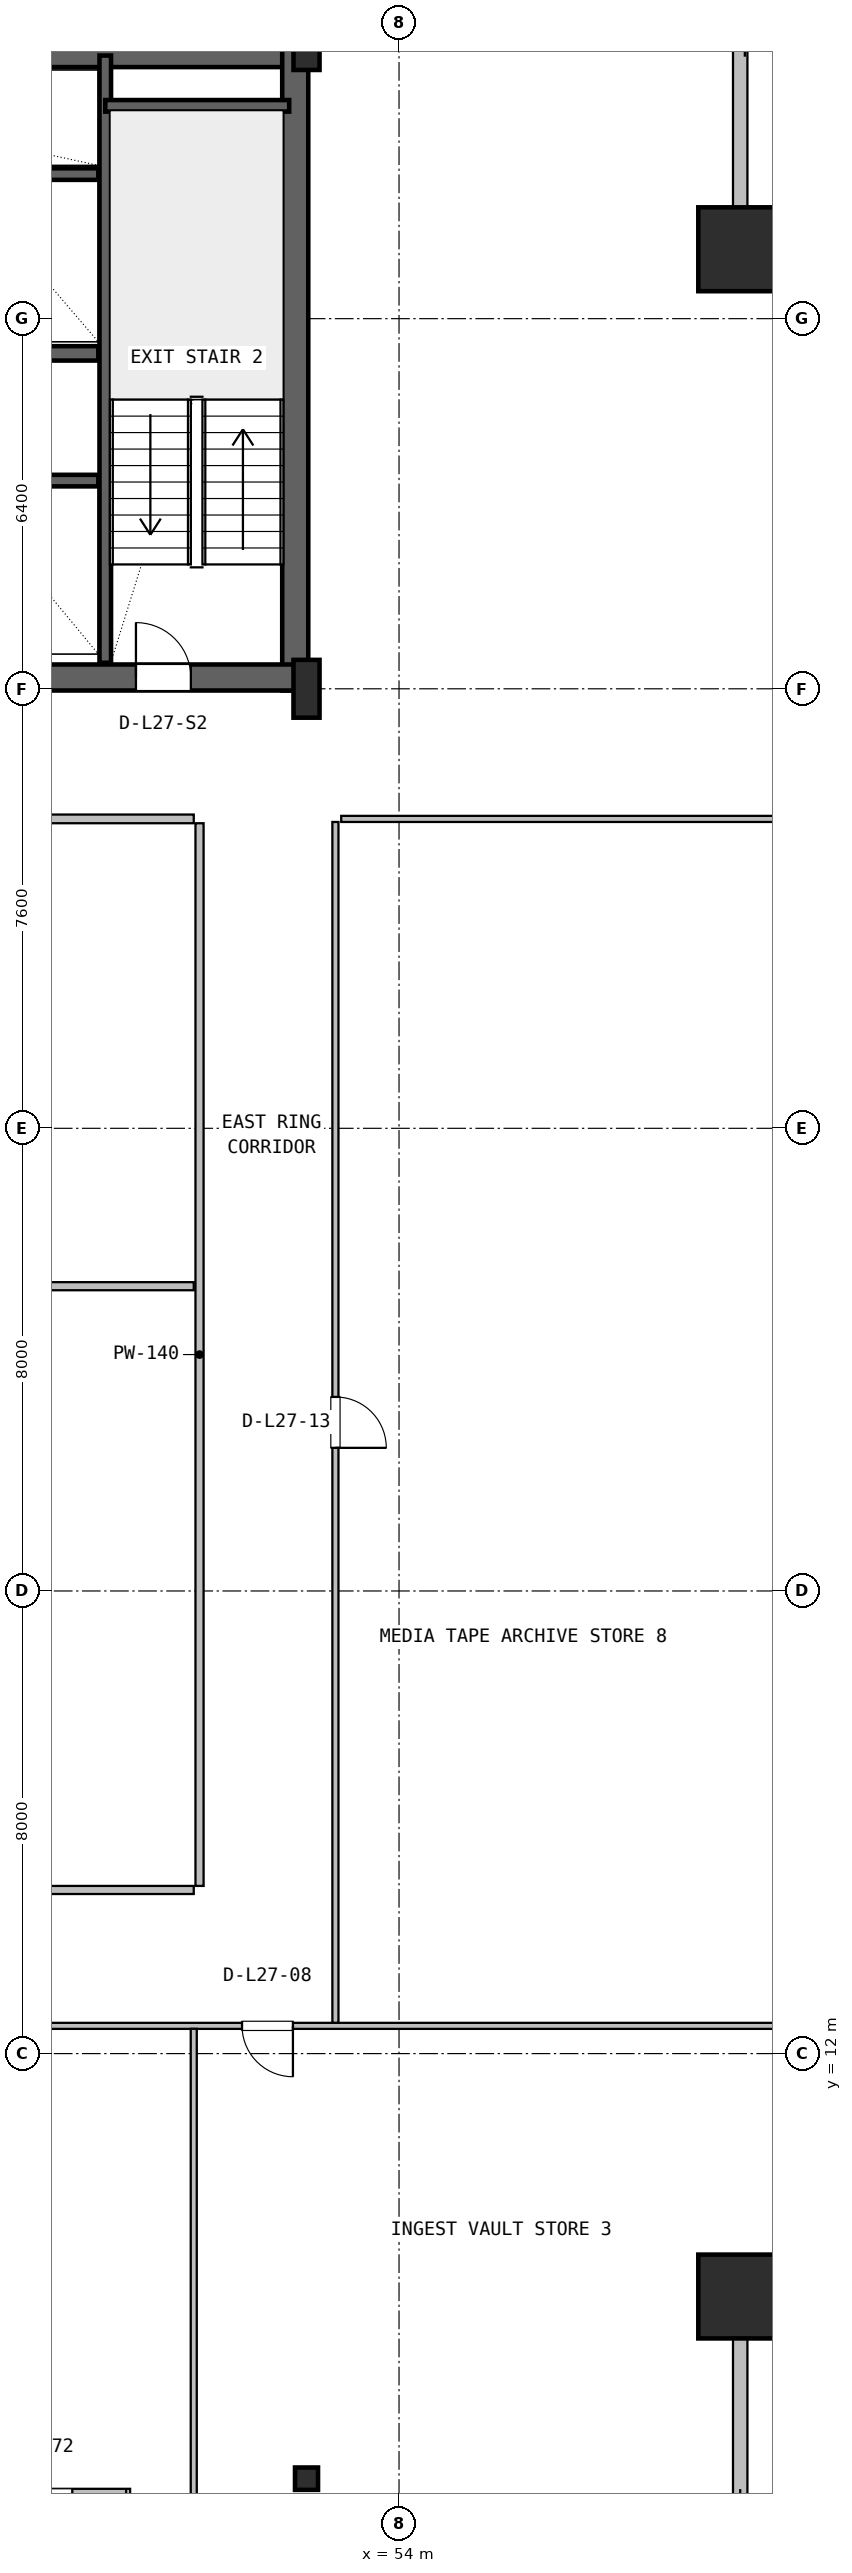
"""IFC4 building model, lengths in metres.
Left out: names, types, materials, properties, quantities, classifications, styles, units other than length and angle.
Written with IfcOpenShell. Run it as: python <this file> out.ifc"""

import sys

from ifc_helpers import new_model, si_unit, direction, frame, frame_2d, origin, origin_2d, place, context, subcontext, project, spatial, rectangle, hollow_rectangle, i_section, extrude, source, transform, mapped, element, fill, save


model = new_model("IFC4")
c1 = context("Model", 3, precision=1e-05, world=origin(), true_north=direction((0.0, 1.0)))
c2 = subcontext(c1, "Body", "Model", "MODEL_VIEW")
j1 = project(units=[si_unit("LENGTHUNIT", "METRE"), si_unit("PLANEANGLEUNIT", "RADIAN")], contexts=[c1])
p1 = place(None, origin())
s1 = spatial("IfcSite", under=j1, at=p1, CompositionType="ELEMENT")
p2 = place(p1, origin())
s2 = spatial("IfcBuilding", under=s1, at=p2, CompositionType="ELEMENT")
p3 = place(p2, frame((0.0, 0.0, 114.4)))
s3 = spatial("IfcBuildingStorey", under=s2, at=p3, CompositionType="ELEMENT", Elevation=114.4)
p4 = place(p3, frame((15.6, 46.575, 0.0), z_axis=(0.0, 0.0, 1.0), x_axis=(1.0, 0.0, 0.0)))
e1 = element("IfcWall", 1, at=p4, inside=s3, PredefinedType="SHEAR", context=c2, shape_type="SweptSolid", body=[
    extrude(rectangle(XDim=36.8, YDim=0.45, at=frame_2d((18.4, 0.0))), origin(), (0.0, 0.0, 1.0), 3.55),
])
p5 = place(p3, frame((52.205, 35.57, 0.0), z_axis=(0.0, 0.0, 1.0), x_axis=(0.0, 1.0, 0.0)))
e2 = element("IfcWall", 2, at=p5, inside=s3, PredefinedType="SHEAR", context=c2, shape_type="SweptSolid", body=[
    extrude(rectangle(XDim=11.23, YDim=0.45, at=frame_2d((5.615, 0.0))), origin(), (0.0, 0.0, 1.0), 3.55),
])
p6 = place(p3, frame((43.2, 35.795, 0.0), z_axis=(0.0, 0.0, 1.0), x_axis=(1.0, 0.0, 0.0)))
e3 = element("IfcWall", 3, at=p6, inside=s3, PredefinedType="SHEAR", context=c2, shape_type="SweptSolid", body=[
    extrude(rectangle(XDim=9.23, YDim=0.45, at=frame_2d((4.615, 0.0))), origin(), (0.0, 0.0, 1.0), 3.55),
])
p7 = place(p6, frame((6.25, 0.0, 0.0)))
e4 = element("IfcOpeningElement", 4, at=p7, cuts=e3, PredefinedType="OPENING", context=c2, shape_type="SweptSolid", body=[
    extrude(rectangle(XDim=0.95, YDim=2.1, at=frame_2d((0.475, 1.05))), frame((0.0, 0.235, 0.0), z_axis=(0.0, -1.0, 0.0), x_axis=(1.0, 0.0, 0.0)), (0.0, 0.0, 1.0), 0.47),
])
m1 = source(origin(), c2, "Body", "SweptSolid", [
    extrude(i_section(OverallWidth=0.45, OverallDepth=1.0, WebThickness=0.016, FlangeThickness=0.03, FilletRadius=0.016, at=origin_2d()), origin(), (0.0, 0.0, 1.0), 3.8),
])
for number, where, z_axis, x_axis in (
    (5, (52.4, 35.6, 0.0), (0.0, 0.0, 1.0), (1.0, 0.0, 0.0)),
    (6, (52.4, 46.8, 0.0), (0.0, 0.0, 1.0), (1.0, 0.0, 0.0)),
):
    element("IfcColumn", number, at=place(p3, frame(where, z_axis=z_axis, x_axis=x_axis)), inside=s3, PredefinedType="COLUMN", context=c2, shape_type="MappedRepresentation", body=[
        mapped(m1, transform((0.0, 0.0, 0.0), x_axis=(1.0, 0.0, 0.0), y_axis=(0.0, 1.0, 0.0), z_axis=(0.0, 0.0, 1.0), scale=1.0)),
    ])
m2 = source(origin(), c2, "Body", "SweptSolid", [
    extrude(hollow_rectangle(XDim=1.45, YDim=1.45, WallThickness=0.055, at=origin_2d()), origin(), (0.0, 0.0, 1.0), 3.8),
])
for number, where, z_axis, x_axis in (
    (7, (59.9, 7.8, 0.0), (0.0, 0.0, 1.0), (1.0, 0.0, 0.0)),
    (8, (59.9, 43.2, 0.0), (0.0, 0.0, 1.0), (1.0, 0.0, 0.0)),
):
    element("IfcColumn", number, at=place(p3, frame(where, z_axis=z_axis, x_axis=x_axis)), inside=s3, PredefinedType="COLUMN", context=c2, shape_type="MappedRepresentation", body=[
        mapped(m2, transform((0.0, 0.0, 0.0), x_axis=(1.0, 0.0, 0.0), y_axis=(0.0, 1.0, 0.0), z_axis=(0.0, 0.0, 1.0), scale=1.0)),
    ])
m3 = source(origin(), c2, "Body", "SweptSolid", [
    extrude(i_section(OverallWidth=0.398, OverallDepth=0.387, WebThickness=0.021, FlangeThickness=0.033, FilletRadius=0.018, at=origin_2d()), origin(), (0.0, 0.0, 1.0), 3.8),
])
p8 = place(p3, frame((52.4, 4.65, 0.0), z_axis=(0.0, 0.0, 1.0), x_axis=(1.0, 0.0, 0.0)))
e9 = element("IfcColumn", 9, at=p8, inside=s3, PredefinedType="COLUMN", context=c2, shape_type="MappedRepresentation", body=[
    mapped(m3, transform((0.0, 0.0, 0.0), x_axis=(1.0, 0.0, 0.0), y_axis=(0.0, 1.0, 0.0), z_axis=(0.0, 0.0, 1.0), scale=1.0)),
])
p9 = place(p3, frame((46.25, 4.35, 0.0), z_axis=(0.0, 0.0, 1.0), x_axis=(1.0, 0.0, 0.0)))
e10 = element("IfcWall", 10, at=p9, inside=s3, PredefinedType="SOLIDWALL", context=c2, shape_type="SweptSolid", body=[
    extrude(rectangle(XDim=3.1, YDim=0.25, at=frame_2d((1.55, 0.0))), origin(), (0.0, 0.0, 1.0), 3.53),
])
p10 = place(p9, frame((1.0, 0.0, 0.0)))
e11 = element("IfcOpeningElement", 11, at=p10, cuts=e10, PredefinedType="OPENING", context=c2, shape_type="SweptSolid", body=[
    extrude(rectangle(XDim=1.1, YDim=2.15, at=frame_2d((0.55, 1.075))), frame((0.0, 0.135, 0.0), z_axis=(0.0, -1.0, 0.0), x_axis=(1.0, 0.0, 0.0)), (0.0, 0.0, 1.0), 0.27),
])
p11 = place(p3, frame((59.9, 4.28, 0.0), z_axis=(0.0, 0.0, 1.0), x_axis=(0.0, 1.0, 0.0)))
e12 = element("IfcWall", 12, at=p11, inside=s3, PredefinedType="SOLIDWALL", context=c2, shape_type="SweptSolid", body=[
    extrude(rectangle(XDim=3.6, YDim=0.25, at=frame_2d((1.8, 0.0))), origin(), (0.0, 0.0, 1.0), 3.108),
])
p12 = place(p3, frame((60.03, 43.2, 0.0), z_axis=(0.0, 0.0, 1.0), x_axis=(1.0, 0.0, 0.0)))
e13 = element("IfcWall", 13, at=p12, inside=s3, PredefinedType="SOLIDWALL", context=c2, shape_type="SweptSolid", body=[
    extrude(rectangle(XDim=3.39, YDim=0.25, at=frame_2d((1.695, 0.0))), origin(), (0.0, 0.0, 1.0), 3.53),
])
p13 = place(p3, frame((59.9, 43.12, 0.0), z_axis=(0.0, 0.0, 1.0), x_axis=(0.0, 1.0, 0.0)))
e14 = element("IfcWall", 14, at=p13, inside=s3, PredefinedType="SOLIDWALL", context=c2, shape_type="SweptSolid", body=[
    extrude(rectangle(XDim=3.6, YDim=0.25, at=frame_2d((1.8, 0.0))), origin(), (0.0, 0.0, 1.0), 3.108),
])
p14 = place(p3, frame((48.92, 36.05, 0.0), z_axis=(0.0, 0.0, 1.0), x_axis=(0.0, 1.0, 0.0)))
e15 = element("IfcWall", 15, at=p14, inside=s3, PredefinedType="SHEAR", context=c2, shape_type="SweptSolid", body=[
    extrude(rectangle(XDim=10.5, YDim=0.2, at=frame_2d((5.25, 0.0))), origin(), (0.0, 0.0, 1.0), 3.55),
])
p15 = place(p3, frame((48.92, 45.68, 0.0), z_axis=(0.0, 0.0, 1.0), x_axis=(1.0, 0.0, 0.0)))
e16 = element("IfcWall", 16, at=p15, inside=s3, PredefinedType="SHEAR", context=c2, shape_type="SweptSolid", body=[
    extrude(rectangle(XDim=3.18, YDim=0.2, at=frame_2d((1.59, 0.0))), origin(), (0.0, 0.0, 1.0), 3.55),
])
p16 = place(p3, frame((24.98, 41.4, 0.0), z_axis=(0.0, 0.0, 1.0), x_axis=(1.0, 0.0, 0.0)))
e17 = element("IfcWall", 17, at=p16, inside=s3, PredefinedType="SHEAR", context=c2, shape_type="SweptSolid", body=[
    extrude(rectangle(XDim=23.82, YDim=0.25, at=frame_2d((11.91, 0.0))), origin(), (0.0, 0.0, 1.0), 3.55),
])
p17 = place(p16, frame((8.87, 0.0, 0.0)))
e18 = element("IfcOpeningElement", 18, at=p17, cuts=e17, PredefinedType="OPENING", context=c2, shape_type="SweptSolid", body=[
    extrude(rectangle(XDim=1.1, YDim=2.18, at=frame_2d((0.55, 1.09))), frame((0.0, 0.135, 0.0), z_axis=(0.0, -1.0, 0.0), x_axis=(1.0, 0.0, 0.0)), (0.0, 0.0, 1.0), 0.27),
])
p18 = place(p16, frame((11.47, 0.0, 0.0)))
e19 = element("IfcOpeningElement", 19, at=p18, cuts=e17, PredefinedType="OPENING", context=c2, shape_type="SweptSolid", body=[
    extrude(rectangle(XDim=1.1, YDim=2.18, at=frame_2d((0.55, 1.09))), frame((0.0, 0.135, 0.0), z_axis=(0.0, -1.0, 0.0), x_axis=(1.0, 0.0, 0.0)), (0.0, 0.0, 1.0), 0.27),
])
p19 = place(p16, frame((14.07, 0.0, 0.0)))
e20 = element("IfcOpeningElement", 20, at=p19, cuts=e17, PredefinedType="OPENING", context=c2, shape_type="SweptSolid", body=[
    extrude(rectangle(XDim=1.1, YDim=2.18, at=frame_2d((0.55, 1.09))), frame((0.0, 0.135, 0.0), z_axis=(0.0, -1.0, 0.0), x_axis=(1.0, 0.0, 0.0)), (0.0, 0.0, 1.0), 0.27),
])
p20 = place(p16, frame((0.96, 0.0, 0.0)))
e21 = element("IfcOpeningElement", 21, at=p20, cuts=e17, PredefinedType="OPENING", context=c2, shape_type="SweptSolid", body=[
    extrude(rectangle(XDim=1.0, YDim=2.08, at=frame_2d((0.5, 1.04))), frame((0.0, 0.135, 0.0), z_axis=(0.0, -1.0, 0.0), x_axis=(1.0, 0.0, 0.0)), (0.0, 0.0, 1.0), 0.27),
])
p21 = place(p16, frame((3.56, 0.0, 0.0)))
e22 = element("IfcOpeningElement", 22, at=p21, cuts=e17, PredefinedType="OPENING", context=c2, shape_type="SweptSolid", body=[
    extrude(rectangle(XDim=1.0, YDim=2.08, at=frame_2d((0.5, 1.04))), frame((0.0, 0.135, 0.0), z_axis=(0.0, -1.0, 0.0), x_axis=(1.0, 0.0, 0.0)), (0.0, 0.0, 1.0), 0.27),
])
p22 = place(p16, frame((6.16, 0.0, 0.0)))
e23 = element("IfcOpeningElement", 23, at=p22, cuts=e17, PredefinedType="OPENING", context=c2, shape_type="SweptSolid", body=[
    extrude(rectangle(XDim=0.92, YDim=2.08, at=frame_2d((0.46, 1.04))), frame((0.0, 0.135, 0.0), z_axis=(0.0, -1.0, 0.0), x_axis=(1.0, 0.0, 0.0)), (0.0, 0.0, 1.0), 0.27),
])
p23 = place(p3, frame((41.22, 44.5, 0.0), z_axis=(0.0, 0.0, 1.0), x_axis=(1.0, 0.0, 0.0)))
e24 = element("IfcWall", 24, at=p23, inside=s3, PredefinedType="SHEAR", context=c2, shape_type="SweptSolid", body=[
    extrude(rectangle(XDim=7.58, YDim=0.2, at=frame_2d((3.79, 0.0))), origin(), (0.0, 0.0, 1.0), 3.55),
])
p24 = place(p3, frame((43.65, 39.2, 0.0), z_axis=(0.0, 0.0, 1.0), x_axis=(1.0, 0.0, 0.0)))
e25 = element("IfcWall", 25, at=p24, inside=s3, PredefinedType="SHEAR", context=c2, shape_type="SweptSolid", body=[
    extrude(rectangle(XDim=5.15, YDim=0.2, at=frame_2d((2.575, 0.0))), origin(), (0.0, 0.0, 1.0), 3.55),
])
p25 = place(p3, frame((4.68, 12.48, 0.0), z_axis=(0.0, 0.0, 1.0), x_axis=(1.0, 0.0, 0.0)))
e26 = element("IfcWall", 26, at=p25, inside=s3, PredefinedType="PARTITIONING", context=c2, shape_type="SweptSolid", body=[
    extrude(rectangle(XDim=58.64, YDim=0.105, at=frame_2d((29.32, 0.0))), origin(), (0.0, 0.0, 1.0), 2.83),
])
p26 = place(p25, frame((13.155, 0.0, 0.0)))
e27 = element("IfcOpeningElement", 27, at=p26, cuts=e26, PredefinedType="OPENING", context=c2, shape_type="SweptSolid", body=[
    extrude(rectangle(XDim=0.88, YDim=2.06, at=frame_2d((0.44, 1.03))), frame((0.0, 0.062, 0.0), z_axis=(0.0, -1.0, 0.0), x_axis=(1.0, 0.0, 0.0)), (0.0, 0.0, 1.0), 0.125),
])
p27 = place(p25, frame((29.88, 0.0, 0.0)))
e28 = element("IfcOpeningElement", 28, at=p27, cuts=e26, PredefinedType="OPENING", context=c2, shape_type="SweptSolid", body=[
    extrude(rectangle(XDim=0.88, YDim=2.06, at=frame_2d((0.44, 1.03))), frame((0.0, 0.062, 0.0), z_axis=(0.0, -1.0, 0.0), x_axis=(1.0, 0.0, 0.0)), (0.0, 0.0, 1.0), 0.125),
])
p28 = place(p25, frame((46.605, 0.0, 0.0)))
e29 = element("IfcOpeningElement", 29, at=p28, cuts=e26, PredefinedType="OPENING", context=c2, shape_type="SweptSolid", body=[
    extrude(rectangle(XDim=0.88, YDim=2.06, at=frame_2d((0.44, 1.03))), frame((0.0, 0.062, 0.0), z_axis=(0.0, -1.0, 0.0), x_axis=(1.0, 0.0, 0.0)), (0.0, 0.0, 1.0), 0.125),
])
p29 = place(p3, frame((50.45, 4.38, 0.0), z_axis=(0.0, 0.0, 1.0), x_axis=(0.0, 1.0, 0.0)))
e30 = element("IfcWall", 30, at=p29, inside=s3, PredefinedType="PARTITIONING", context=c2, shape_type="SweptSolid", body=[
    extrude(rectangle(XDim=8.048, YDim=0.105, at=frame_2d((4.024, 0.0))), origin(), (0.0, 0.0, 1.0), 3.108),
])
p30 = place(p3, frame((19.55, 14.83, 0.0), z_axis=(0.0, 0.0, 1.0), x_axis=(1.0, 0.0, 0.0)))
e31 = element("IfcWall", 31, at=p30, inside=s3, PredefinedType="PARTITIONING", context=c2, shape_type="SweptSolid", body=[
    extrude(rectangle(XDim=30.9, YDim=0.14, at=frame_2d((15.45, 0.0))), origin(), (0.0, 0.0, 1.0), 2.83),
])
p31 = place(p30, frame((14.95, 0.0, 0.0)))
e32 = element("IfcOpeningElement", 32, at=p31, cuts=e31, PredefinedType="OPENING", context=c2, shape_type="SweptSolid", body=[
    extrude(rectangle(XDim=1.0, YDim=2.1, at=frame_2d((0.5, 1.05))), frame((0.0, 0.08, 0.0), z_axis=(0.0, -1.0, 0.0), x_axis=(1.0, 0.0, 0.0)), (0.0, 0.0, 1.0), 0.16),
])
p32 = place(p3, frame((50.55, 14.9, 0.0), z_axis=(0.0, 0.0, 1.0), x_axis=(0.0, 1.0, 0.0)))
e33 = element("IfcWall", 33, at=p32, inside=s3, PredefinedType="PARTITIONING", context=c2, shape_type="SweptSolid", body=[
    extrude(rectangle(XDim=18.375, YDim=0.14, at=frame_2d((9.188, 0.0))), origin(), (0.0, 0.0, 1.0), 3.222),
])
p33 = place(p3, frame((19.55, 25.27, 0.0), z_axis=(0.0, 0.0, 1.0), x_axis=(1.0, 0.0, 0.0)))
e34 = element("IfcWall", 34, at=p33, inside=s3, PredefinedType="PARTITIONING", context=c2, shape_type="SweptSolid", body=[
    extrude(rectangle(XDim=30.9, YDim=0.14, at=frame_2d((15.45, 0.0))), origin(), (0.0, 0.0, 1.0), 2.83),
])
p34 = place(p3, frame((19.55, 33.35, 0.0), z_axis=(0.0, 0.0, 1.0), x_axis=(1.0, 0.0, 0.0)))
e35 = element("IfcWall", 35, at=p34, inside=s3, PredefinedType="PARTITIONING", context=c2, shape_type="SweptSolid", body=[
    extrude(rectangle(XDim=30.9, YDim=0.15, at=frame_2d((15.45, 0.0))), origin(), (0.0, 0.0, 1.0), 2.83),
])
p35 = place(p34, frame((15.01, 0.0, 0.0)))
e36 = element("IfcOpeningElement", 36, at=p35, cuts=e35, PredefinedType="OPENING", context=c2, shape_type="SweptSolid", body=[
    extrude(rectangle(XDim=0.88, YDim=2.06, at=frame_2d((0.44, 1.03))), frame((0.0, 0.085, 0.0), z_axis=(0.0, -1.0, 0.0), x_axis=(1.0, 0.0, 0.0)), (0.0, 0.0, 1.0), 0.17),
])
p36 = place(p3, frame((53.0, 33.35, 0.0), z_axis=(0.0, 0.0, 1.0), x_axis=(1.0, 0.0, 0.0)))
e37 = element("IfcWall", 37, at=p36, inside=s3, PredefinedType="PARTITIONING", context=c2, shape_type="SweptSolid", body=[
    extrude(rectangle(XDim=10.32, YDim=0.105, at=frame_2d((5.16, 0.0))), origin(), (0.0, 0.0, 1.0), 3.108),
])
p37 = place(p3, frame((52.9, 12.533, 0.0), z_axis=(0.0, 0.0, 1.0), x_axis=(0.0, 1.0, 0.0)))
e38 = element("IfcWall", 38, at=p37, inside=s3, PredefinedType="PARTITIONING", context=c2, shape_type="SweptSolid", body=[
    extrude(rectangle(XDim=20.764, YDim=0.105, at=frame_2d((10.382, 0.0))), origin(), (0.0, 0.0, 1.0), 3.222),
])
p38 = place(p37, frame((9.942, 0.0, 0.0)))
e39 = element("IfcOpeningElement", 39, at=p38, cuts=e38, PredefinedType="OPENING", context=c2, shape_type="SweptSolid", body=[
    extrude(rectangle(XDim=0.88, YDim=2.06, at=frame_2d((0.44, 1.03))), frame((0.0, 0.062, 0.0), z_axis=(0.0, -1.0, 0.0), x_axis=(1.0, 0.0, 0.0)), (0.0, 0.0, 1.0), 0.125),
])
m4 = source(origin(), c2, "Body", "SweptSolid", [
    extrude(rectangle(XDim=0.95, YDim=2.1, at=frame_2d((0.475, 1.05))), frame((0.0, 0.025, 0.0), z_axis=(0.0, -1.0, 0.0), x_axis=(1.0, 0.0, 0.0)), (0.0, 0.0, 1.0), 0.05),
])
p39 = place(p7, origin())
e40 = element("IfcDoor", 40, at=p39, inside=s3, OperationType="SINGLE_SWING_LEFT", PredefinedType="DOOR", context=c2, shape_type="MappedRepresentation", body=[
    mapped(m4, transform((0.0, 0.0, 0.0), x_axis=(1.0, 0.0, 0.0), y_axis=(0.0, 1.0, 0.0), z_axis=(0.0, 0.0, 1.0), scale=1.0)),
])
fill(e4, e40)
m5 = source(origin(), c2, "Body", "SweptSolid", [
    extrude(rectangle(XDim=0.88, YDim=2.06, at=frame_2d((0.44, 1.03))), frame((0.0, 0.025, 0.0), z_axis=(0.0, -1.0, 0.0), x_axis=(1.0, 0.0, 0.0)), (0.0, 0.0, 1.0), 0.05),
])
p40 = place(p28, frame((0.88, 0.0, 0.0), z_axis=(0.0, 0.0, 1.0), x_axis=(-1.0, 0.0, 0.0)))
e41 = element("IfcDoor", 41, at=p40, inside=s3, OperationType="SINGLE_SWING_RIGHT", PredefinedType="DOOR", context=c2, shape_type="MappedRepresentation", body=[
    mapped(m5, transform((0.0, 0.0, 0.0), x_axis=(1.0, 0.0, 0.0), y_axis=(0.0, 1.0, 0.0), z_axis=(0.0, 0.0, 1.0), scale=1.0)),
])
fill(e29, e41)
p41 = place(p38, frame((0.88, 0.0, 0.0), z_axis=(0.0, 0.0, 1.0), x_axis=(-1.0, 0.0, 0.0)))
e42 = element("IfcDoor", 42, at=p41, inside=s3, OperationType="SINGLE_SWING_LEFT", PredefinedType="DOOR", context=c2, shape_type="MappedRepresentation", body=[
    mapped(m5, transform((0.0, 0.0, 0.0), x_axis=(1.0, 0.0, 0.0), y_axis=(0.0, 1.0, 0.0), z_axis=(0.0, 0.0, 1.0), scale=1.0)),
])
fill(e39, e42)
save(model, sys.argv[1])
